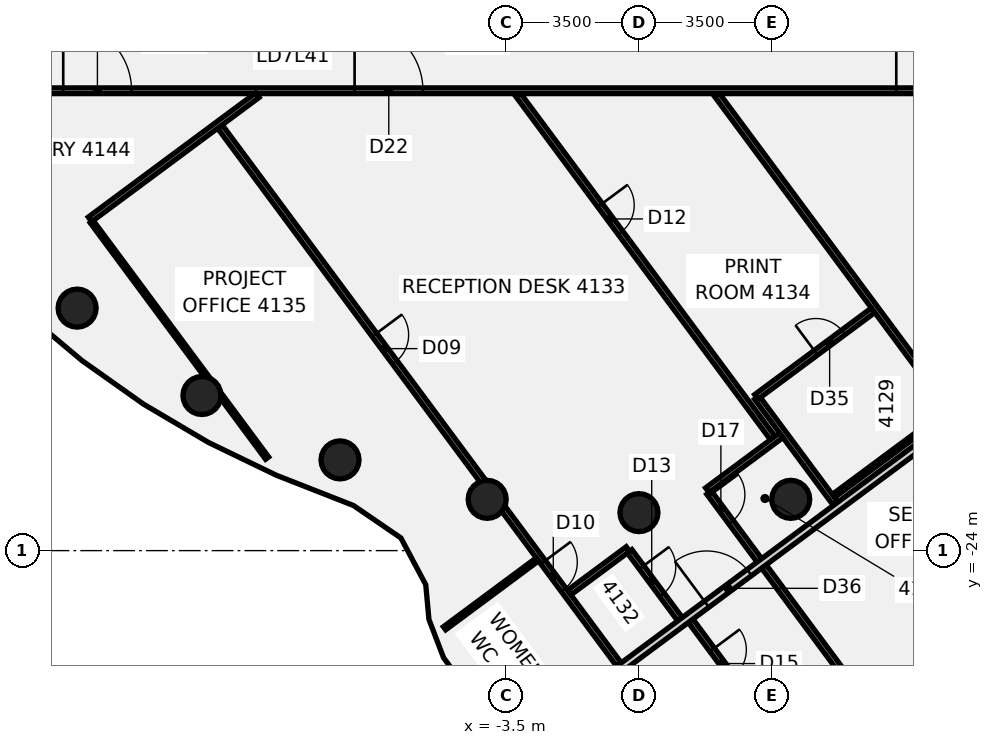
"""IFC4 building model, lengths in metres.
Left out: names, types, materials, properties, quantities, classifications, styles, units other than length and angle.
Written with IfcOpenShell. Run it as: python <this file> out.ifc"""

import sys

from ifc_helpers import new_model, si_unit, direction, frame, frame_2d, origin, origin_2d, place, context, subcontext, project, spatial, rectangle, circle, extrude, element, fill, save


model = new_model("IFC4")
c1 = context("Model", 3, precision=1e-05, world=origin(), true_north=direction((0.0, 1.0)))
c2 = subcontext(c1, "Body", "Model", "MODEL_VIEW")
j1 = project(units=[si_unit("LENGTHUNIT", "METRE"), si_unit("PLANEANGLEUNIT", "RADIAN")], contexts=[c1])
p1 = place(None, origin())
s1 = spatial("IfcSite", under=j1, at=p1, CompositionType="ELEMENT")
p2 = place(p1, origin())
s2 = spatial("IfcBuilding", under=s1, at=p2, CompositionType="ELEMENT")
p3 = place(p2, frame((0.0, 0.0, 166.75)))
s3 = spatial("IfcBuildingStorey", under=s2, at=p3, CompositionType="ELEMENT", Elevation=166.75)
for number, where, z_axis, x_axis in (
    (1, (-14.784, -17.619, -0.14), (0.0, 0.0, 1.0), (1.0, 0.0, 0.0)),
    (2, (-11.5, -19.919, -0.14), (0.0, 0.0, 1.0), (1.0, 0.0, 0.0)),
    (3, (-7.866, -21.613, -0.14), (0.0, 0.0, 1.0), (1.0, 0.0, 0.0)),
    (4, (-3.994, -22.651, -0.14), (0.0, 0.0, 1.0), (1.0, 0.0, 0.0)),
    (5, (0.0, -23.0, -0.14), (0.0, 0.0, 1.0), (1.0, 0.0, 0.0)),
    (6, (3.994, -22.651, -0.14), (0.0, 0.0, 1.0), (1.0, 0.0, 0.0)),
):
    element("IfcColumn", number, at=place(p3, frame(where, z_axis=z_axis, x_axis=x_axis)), inside=s3, PredefinedType="COLUMN", context=c2, shape_type="SweptSolid", body=[
        extrude(circle(Radius=0.5, at=origin_2d()), origin(), (0.0, 0.0, 1.0), 3.75),
    ])
p4 = place(p3, frame((-14.4, -15.344, 0.0), z_axis=(0.0, 0.0, 1.0), x_axis=(0.595809139837, -0.803126060396, 0.0)))
e7 = element("IfcWall", 7, at=p4, inside=s3, PredefinedType="PARTITIONING", context=c2, shape_type="SweptSolid", body=[
    extrude(rectangle(XDim=5.108, YDim=0.1, at=frame_2d((2.554, 0.0))), origin(), (0.0, 0.0, 1.0), 3.01),
])
p5 = place(p3, frame((-10.994, -19.935, 0.0), z_axis=(0.0, 0.0, 1.0), x_axis=(0.595779392593, -0.803148127908, 0.0)))
e8 = element("IfcWall", 8, at=p5, inside=s3, PredefinedType="PARTITIONING", context=c2, shape_type="SweptSolid", body=[
    extrude(rectangle(XDim=2.031, YDim=0.1, at=frame_2d((1.016, 0.0))), origin(), (0.0, 0.0, 1.0), 3.01),
])
p6 = place(p3, frame((-11.024, -12.846, 0.0), z_axis=(0.0, 0.0, 1.0), x_axis=(0.595804045693, -0.803129839525, 0.0)))
e9 = element("IfcWall", 9, at=p6, inside=s3, PredefinedType="PARTITIONING", context=c2, shape_type="SweptSolid", body=[
    extrude(rectangle(XDim=11.846, YDim=0.15, at=frame_2d((5.923, 0.0))), origin(), (0.0, 0.0, 1.0), 3.01),
])
p7 = place(p6, frame((6.82, 0.0, 0.0)))
e10 = element("IfcOpeningElement", 10, at=p7, cuts=e9, PredefinedType="OPENING", context=c2, shape_type="SweptSolid", body=[
    extrude(rectangle(XDim=0.9, YDim=2.1, at=frame_2d((0.45, 1.05))), frame((0.0, 0.085, 0.0), z_axis=(0.0, -1.0, 0.0), x_axis=(1.0, 0.0, 0.0)), (0.0, 0.0, 1.0), 0.17),
])
p8 = place(p3, frame((-3.698, -22.722, 0.0), z_axis=(0.0, 0.0, 1.0), x_axis=(0.595780136415, -0.803147576136, 0.0)))
e11 = element("IfcWall", 11, at=p8, inside=s3, PredefinedType="PARTITIONING", context=c2, shape_type="SweptSolid", body=[
    extrude(rectangle(XDim=5.324, YDim=0.15, at=frame_2d((2.662, 0.0))), origin(), (0.0, 0.0, 1.0), 3.01),
])
p9 = place(p8, frame((1.973, 0.0, 0.0)))
e12 = element("IfcOpeningElement", 12, at=p9, cuts=e11, PredefinedType="OPENING", context=c2, shape_type="SweptSolid", body=[
    extrude(rectangle(XDim=0.9, YDim=2.1, at=frame_2d((0.45, 1.05))), frame((0.0, 0.085, 0.0), z_axis=(0.0, -1.0, 0.0), x_axis=(1.0, 0.0, 0.0)), (0.0, 0.0, 1.0), 0.17),
])
p10 = place(p3, frame((-3.185, -12.0, 0.0), z_axis=(0.0, 0.0, 1.0), x_axis=(0.595796799858, -0.803135214817, 0.0)))
e13 = element("IfcWall", 13, at=p10, inside=s3, PredefinedType="PARTITIONING", context=c2, shape_type="SweptSolid", body=[
    extrude(rectangle(XDim=11.249, YDim=0.15, at=frame_2d((5.624, 0.0))), origin(), (0.0, 0.0, 1.0), 3.01),
])
p11 = place(p10, frame((3.625, 0.0, 0.0)))
e14 = element("IfcOpeningElement", 14, at=p11, cuts=e13, PredefinedType="OPENING", context=c2, shape_type="SweptSolid", body=[
    extrude(rectangle(XDim=0.9, YDim=2.1, at=frame_2d((0.45, 1.05))), frame((0.0, 0.085, 0.0), z_axis=(0.0, -1.0, 0.0), x_axis=(1.0, 0.0, 0.0)), (0.0, 0.0, 1.0), 0.17),
])
p12 = place(p3, frame((-0.245, -24.018, 0.0), z_axis=(0.0, 0.0, 1.0), x_axis=(0.595725941759, -0.803187775252, 0.0)))
e15 = element("IfcWall", 15, at=p12, inside=s3, PredefinedType="PARTITIONING", context=c2, shape_type="SweptSolid", body=[
    extrude(rectangle(XDim=2.225, YDim=0.15, at=frame_2d((1.113, 0.0))), origin(), (0.0, 0.0, 1.0), 3.01),
])
p13 = place(p12, frame((0.525, 0.0, 0.0)))
e16 = element("IfcOpeningElement", 16, at=p13, cuts=e15, PredefinedType="OPENING", context=c2, shape_type="SweptSolid", body=[
    extrude(rectangle(XDim=0.9, YDim=2.1, at=frame_2d((0.45, 1.05))), frame((0.0, 0.085, 0.0), z_axis=(0.0, -1.0, 0.0), x_axis=(1.0, 0.0, 0.0)), (0.0, 0.0, 1.0), 0.17),
])
p14 = place(p3, frame((1.36, -25.847, 0.0), z_axis=(0.0, 0.0, 1.0), x_axis=(0.595903510496, -0.803056041742, 0.0)))
e17 = element("IfcWall", 17, at=p14, inside=s3, PredefinedType="PARTITIONING", context=c2, shape_type="SweptSolid", body=[
    extrude(rectangle(XDim=3.86, YDim=0.15, at=frame_2d((1.93, 0.0))), origin(), (0.0, 0.0, 1.0), 3.01),
])
p15 = place(p14, frame((0.95, 0.0, 0.0)))
e18 = element("IfcOpeningElement", 18, at=p15, cuts=e17, PredefinedType="OPENING", context=c2, shape_type="SweptSolid", body=[
    extrude(rectangle(XDim=0.9, YDim=2.1, at=frame_2d((0.45, 1.05))), frame((0.0, 0.085, 0.0), z_axis=(0.0, -1.0, 0.0), x_axis=(1.0, 0.0, 0.0)), (0.0, 0.0, 1.0), 0.17),
])
p16 = place(p3, frame((1.846, -22.473, 0.0), z_axis=(0.0, 0.0, 1.0), x_axis=(0.595730224084, -0.803184599026, 0.0)))
e19 = element("IfcWall", 19, at=p16, inside=s3, PredefinedType="PARTITIONING", context=c2, shape_type="SweptSolid", body=[
    extrude(rectangle(XDim=20.24, YDim=0.15, at=frame_2d((10.12, 0.0))), origin(), (0.0, 0.0, 1.0), 3.01),
])
p17 = place(p16, frame((0.07, 0.0, 0.0)))
e20 = element("IfcOpeningElement", 20, at=p17, cuts=e19, PredefinedType="OPENING", context=c2, shape_type="SweptSolid", body=[
    extrude(rectangle(XDim=0.9, YDim=2.1, at=frame_2d((0.45, 1.05))), frame((0.0, 0.085, 0.0), z_axis=(0.0, -1.0, 0.0), x_axis=(1.0, 0.0, 0.0)), (0.0, 0.0, 1.0), 0.17),
])
p18 = place(p16, frame((10.57, 0.0, 0.0)))
e21 = element("IfcOpeningElement", 21, at=p18, cuts=e19, PredefinedType="OPENING", context=c2, shape_type="SweptSolid", body=[
    extrude(rectangle(XDim=0.9, YDim=2.1, at=frame_2d((0.45, 1.05))), frame((0.0, 0.085, 0.0), z_axis=(0.0, -1.0, 0.0), x_axis=(1.0, 0.0, 0.0)), (0.0, 0.0, 1.0), 0.17),
])
p19 = place(p16, frame((17.021, 0.0, 0.0)))
e22 = element("IfcOpeningElement", 22, at=p19, cuts=e19, PredefinedType="OPENING", context=c2, shape_type="SweptSolid", body=[
    extrude(rectangle(XDim=0.9, YDim=2.1, at=frame_2d((0.45, 1.05))), frame((0.0, 0.085, 0.0), z_axis=(0.0, -1.0, 0.0), x_axis=(1.0, 0.0, 0.0)), (0.0, 0.0, 1.0), 0.17),
])
p20 = place(p3, frame((2.045, -12.0, 0.0), z_axis=(0.0, 0.0, 1.0), x_axis=(0.595715728825, -0.803195350105, 0.0)))
e23 = element("IfcWall", 23, at=p20, inside=s3, PredefinedType="PARTITIONING", context=c2, shape_type="SweptSolid", body=[
    extrude(rectangle(XDim=13.823, YDim=0.15, at=frame_2d((6.911, 0.0))), origin(), (0.0, 0.0, 1.0), 3.01),
])
p21 = place(p3, frame((3.103, -19.972, 0.0), z_axis=(0.0, 0.0, 1.0), x_axis=(0.595758856769, -0.80316336108, 0.0)))
e24 = element("IfcWall", 24, at=p21, inside=s3, PredefinedType="PARTITIONING", context=c2, shape_type="SweptSolid", body=[
    extrude(rectangle(XDim=3.461, YDim=0.15, at=frame_2d((1.73, 0.0))), origin(), (0.0, 0.0, 1.0), 3.01),
])
p22 = place(p3, frame((-17.1, -11.9, 0.0), z_axis=(0.0, 0.0, 1.0), x_axis=(1.0, 0.0, 0.0)))
e25 = element("IfcWall", 25, at=p22, inside=s3, PredefinedType="PARTITIONING", context=c2, shape_type="SweptSolid", body=[
    extrude(rectangle(XDim=34.165, YDim=0.15, at=frame_2d((17.083, 0.0))), origin(), (0.0, 0.0, 1.0), 3.01),
])
p23 = place(p22, frame((9.617, 0.0, 0.0)))
e26 = element("IfcOpeningElement", 26, at=p23, cuts=e25, PredefinedType="OPENING", context=c2, shape_type="SweptSolid", body=[
    extrude(rectangle(XDim=1.8, YDim=2.1, at=frame_2d((0.9, 1.05))), frame((0.0, 0.085, 0.0), z_axis=(0.0, -1.0, 0.0), x_axis=(1.0, 0.0, 0.0)), (0.0, 0.0, 1.0), 0.17),
])
p24 = place(p22, frame((1.95, 0.0, 0.0)))
e27 = element("IfcOpeningElement", 27, at=p24, cuts=e25, PredefinedType="OPENING", context=c2, shape_type="SweptSolid", body=[
    extrude(rectangle(XDim=1.8, YDim=2.1, at=frame_2d((0.9, 1.05))), frame((0.0, 0.085, 0.0), z_axis=(0.0, -1.0, 0.0), x_axis=(1.0, 0.0, 0.0)), (0.0, 0.0, 1.0), 0.17),
])
p25 = place(p22, frame((23.871, 0.0, 0.0)))
e28 = element("IfcOpeningElement", 28, at=p25, cuts=e25, PredefinedType="OPENING", context=c2, shape_type="SweptSolid", body=[
    extrude(rectangle(XDim=1.8, YDim=2.1, at=frame_2d((0.9, 1.05))), frame((0.0, 0.085, 0.0), z_axis=(0.0, -1.0, 0.0), x_axis=(1.0, 0.0, 0.0)), (0.0, 0.0, 1.0), 0.17),
])
p26 = place(p3, frame((-14.445, -15.284, 0.0), z_axis=(0.0, 0.0, 1.0), x_axis=(0.803166728219, 0.595754317385, 0.0)))
e29 = element("IfcWall", 29, at=p26, inside=s3, PredefinedType="PARTITIONING", context=c2, shape_type="SweptSolid", body=[
    extrude(rectangle(XDim=5.485, YDim=0.15, at=frame_2d((2.743, 0.0))), origin(), (0.0, 0.0, 1.0), 3.01),
])
p27 = place(p3, frame((-5.115, -26.043, 0.0), z_axis=(0.0, 0.0, 1.0), x_axis=(0.803080684867, 0.595870299304, 0.0)))
e30 = element("IfcWall", 30, at=p27, inside=s3, PredefinedType="PARTITIONING", context=c2, shape_type="SweptSolid", body=[
    extrude(rectangle(XDim=3.042, YDim=0.1, at=frame_2d((1.521, 0.0))), origin(), (0.0, 0.0, 1.0), 3.01),
])
p28 = place(p3, frame((3.09, -19.955, 0.0), z_axis=(0.0, 0.0, 1.0), x_axis=(0.803088161311, 0.595860222839, 0.0)))
e31 = element("IfcWall", 31, at=p28, inside=s3, PredefinedType="PARTITIONING", context=c2, shape_type="SweptSolid", body=[
    extrude(rectangle(XDim=3.82, YDim=0.15, at=frame_2d((1.91, 0.0))), origin(), (0.0, 0.0, 1.0), 3.01),
])
p29 = place(p28, frame((1.95, 0.0, 0.0)))
e32 = element("IfcOpeningElement", 32, at=p29, cuts=e31, PredefinedType="OPENING", context=c2, shape_type="SweptSolid", body=[
    extrude(rectangle(XDim=0.9, YDim=2.1, at=frame_2d((0.45, 1.05))), frame((0.0, 0.085, 0.0), z_axis=(0.0, -1.0, 0.0), x_axis=(1.0, 0.0, 0.0)), (0.0, 0.0, 1.0), 0.17),
])
p30 = place(p3, frame((-3.116, -29.043, 0.0), z_axis=(0.0, 0.0, 1.0), x_axis=(0.803114725205, 0.595824418901, 0.0)))
e33 = element("IfcWall", 33, at=p30, inside=s3, PredefinedType="PARTITIONING", context=c2, shape_type="SweptSolid", body=[
    extrude(rectangle(XDim=14.219, YDim=0.2, at=frame_2d((7.11, 0.0))), origin(), (0.0, 0.0, 1.0), 3.01),
])
p31 = place(p30, frame((6.099, 0.0, 0.0)))
e34 = element("IfcOpeningElement", 34, at=p31, cuts=e33, PredefinedType="OPENING", context=c2, shape_type="SweptSolid", body=[
    extrude(rectangle(XDim=1.4, YDim=2.1, at=frame_2d((0.7, 1.05))), frame((0.0, 0.11, 0.0), z_axis=(0.0, -1.0, 0.0), x_axis=(1.0, 0.0, 0.0)), (0.0, 0.0, 1.0), 0.22),
])
p32 = place(p3, frame((-1.833, -25.102, 0.0), z_axis=(0.0, 0.0, 1.0), x_axis=(0.803176502208, 0.595741140346, 0.0)))
e35 = element("IfcWall", 35, at=p32, inside=s3, PredefinedType="PARTITIONING", context=c2, shape_type="SweptSolid", body=[
    extrude(rectangle(XDim=1.921, YDim=0.15, at=frame_2d((0.96, 0.0))), origin(), (0.0, 0.0, 1.0), 3.01),
])
p33 = place(p3, frame((1.798, -22.409, 0.0), z_axis=(0.0, 0.0, 1.0), x_axis=(0.803172774145, 0.595746166477, 0.0)))
e36 = element("IfcWall", 36, at=p33, inside=s3, PredefinedType="PARTITIONING", context=c2, shape_type="SweptSolid", body=[
    extrude(rectangle(XDim=2.42, YDim=0.15, at=frame_2d((1.21, 0.0))), origin(), (0.0, 0.0, 1.0), 3.01),
])
p34 = place(p3, frame((5.121, -22.559, 0.0), z_axis=(0.0, 0.0, 1.0), x_axis=(0.803099035859, 0.595845566067, 0.0)))
e37 = element("IfcWall", 37, at=p34, inside=s3, PredefinedType="PARTITIONING", context=c2, shape_type="SweptSolid", body=[
    extrude(rectangle(XDim=3.74, YDim=0.1, at=frame_2d((1.87, 0.0))), origin(), (0.0, 0.0, 1.0), 3.01),
])
p35 = place(p7, frame((0.9, 0.0, 0.0), z_axis=(0.0, 0.0, 1.0), x_axis=(-1.0, 0.0, 0.0)))
e38 = element("IfcDoor", 38, at=p35, inside=s3, OperationType="SINGLE_SWING_RIGHT", PredefinedType="DOOR", context=c2, shape_type="SweptSolid", body=[
    extrude(rectangle(XDim=0.9, YDim=2.1, at=frame_2d((0.45, 1.05))), frame((0.0, 0.025, 0.0), z_axis=(0.0, -1.0, 0.0), x_axis=(1.0, 0.0, 0.0)), (0.0, 0.0, 1.0), 0.05),
])
fill(e10, e38)
p36 = place(p9, frame((0.9, 0.0, 0.0), z_axis=(0.0, 0.0, 1.0), x_axis=(-1.0, 0.0, 0.0)))
e39 = element("IfcDoor", 39, at=p36, inside=s3, OperationType="SINGLE_SWING_LEFT", PredefinedType="DOOR", context=c2, shape_type="SweptSolid", body=[
    extrude(rectangle(XDim=0.9, YDim=2.1, at=frame_2d((0.45, 1.05))), frame((0.0, 0.025, 0.0), z_axis=(0.0, -1.0, 0.0), x_axis=(1.0, 0.0, 0.0)), (0.0, 0.0, 1.0), 0.05),
])
fill(e12, e39)
p37 = place(p11, origin())
e40 = element("IfcDoor", 40, at=p37, inside=s3, OperationType="SINGLE_SWING_RIGHT", PredefinedType="DOOR", context=c2, shape_type="SweptSolid", body=[
    extrude(rectangle(XDim=0.9, YDim=2.1, at=frame_2d((0.45, 1.05))), frame((0.0, 0.025, 0.0), z_axis=(0.0, -1.0, 0.0), x_axis=(1.0, 0.0, 0.0)), (0.0, 0.0, 1.0), 0.05),
])
fill(e14, e40)
p38 = place(p13, frame((0.9, 0.0, 0.0), z_axis=(0.0, 0.0, 1.0), x_axis=(-1.0, 0.0, 0.0)))
e41 = element("IfcDoor", 41, at=p38, inside=s3, OperationType="SINGLE_SWING_LEFT", PredefinedType="DOOR", context=c2, shape_type="SweptSolid", body=[
    extrude(rectangle(XDim=0.9, YDim=2.1, at=frame_2d((0.45, 1.05))), frame((0.0, 0.025, 0.0), z_axis=(0.0, -1.0, 0.0), x_axis=(1.0, 0.0, 0.0)), (0.0, 0.0, 1.0), 0.05),
])
fill(e16, e41)
p39 = place(p15, frame((0.9, 0.0, 0.0), z_axis=(0.0, 0.0, 1.0), x_axis=(-1.0, 0.0, 0.0)))
e42 = element("IfcDoor", 42, at=p39, inside=s3, OperationType="SINGLE_SWING_LEFT", PredefinedType="DOOR", context=c2, shape_type="SweptSolid", body=[
    extrude(rectangle(XDim=0.9, YDim=2.1, at=frame_2d((0.45, 1.05))), frame((0.0, 0.025, 0.0), z_axis=(0.0, -1.0, 0.0), x_axis=(1.0, 0.0, 0.0)), (0.0, 0.0, 1.0), 0.05),
])
fill(e18, e42)
p40 = place(p17, origin())
e43 = element("IfcDoor", 43, at=p40, inside=s3, OperationType="SINGLE_SWING_RIGHT", PredefinedType="DOOR", context=c2, shape_type="SweptSolid", body=[
    extrude(rectangle(XDim=0.9, YDim=2.1, at=frame_2d((0.45, 1.05))), frame((0.0, 0.025, 0.0), z_axis=(0.0, -1.0, 0.0), x_axis=(1.0, 0.0, 0.0)), (0.0, 0.0, 1.0), 0.05),
])
fill(e20, e43)
p41 = place(p23, origin())
e44 = element("IfcDoor", 44, at=p41, inside=s3, OperationType="DOUBLE_DOOR_SINGLE_SWING", PredefinedType="DOOR", context=c2, shape_type="SweptSolid", body=[
    extrude(rectangle(XDim=1.8, YDim=2.1, at=frame_2d((0.9, 1.05))), frame((0.0, 0.025, 0.0), z_axis=(0.0, -1.0, 0.0), x_axis=(1.0, 0.0, 0.0)), (0.0, 0.0, 1.0), 0.05),
])
fill(e26, e44)
p42 = place(p24, frame((1.8, 0.0, 0.0), z_axis=(0.0, 0.0, 1.0), x_axis=(-1.0, 0.0, 0.0)))
e45 = element("IfcDoor", 45, at=p42, inside=s3, OperationType="DOUBLE_DOOR_SINGLE_SWING", PredefinedType="DOOR", context=c2, shape_type="SweptSolid", body=[
    extrude(rectangle(XDim=1.8, YDim=2.1, at=frame_2d((0.9, 1.05))), frame((0.0, 0.025, 0.0), z_axis=(0.0, -1.0, 0.0), x_axis=(1.0, 0.0, 0.0)), (0.0, 0.0, 1.0), 0.05),
])
fill(e27, e45)
p43 = place(p25, frame((1.8, 0.0, 0.0), z_axis=(0.0, 0.0, 1.0), x_axis=(-1.0, 0.0, 0.0)))
e46 = element("IfcDoor", 46, at=p43, inside=s3, OperationType="DOUBLE_DOOR_SINGLE_SWING", PredefinedType="DOOR", context=c2, shape_type="SweptSolid", body=[
    extrude(rectangle(XDim=1.8, YDim=2.1, at=frame_2d((0.9, 1.05))), frame((0.0, 0.025, 0.0), z_axis=(0.0, -1.0, 0.0), x_axis=(1.0, 0.0, 0.0)), (0.0, 0.0, 1.0), 0.05),
])
fill(e28, e46)
p44 = place(p29, frame((0.9, 0.0, 0.0), z_axis=(0.0, 0.0, 1.0), x_axis=(-1.0, 0.0, 0.0)))
e47 = element("IfcDoor", 47, at=p44, inside=s3, OperationType="SINGLE_SWING_RIGHT", PredefinedType="DOOR", context=c2, shape_type="SweptSolid", body=[
    extrude(rectangle(XDim=0.9, YDim=2.1, at=frame_2d((0.45, 1.05))), frame((0.0, 0.025, 0.0), z_axis=(0.0, -1.0, 0.0), x_axis=(1.0, 0.0, 0.0)), (0.0, 0.0, 1.0), 0.05),
])
fill(e32, e47)
p45 = place(p31, origin())
e48 = element("IfcDoor", 48, at=p45, inside=s3, OperationType="DOUBLE_DOOR_SINGLE_SWING", PredefinedType="DOOR", context=c2, shape_type="SweptSolid", body=[
    extrude(rectangle(XDim=1.4, YDim=2.1, at=frame_2d((0.7, 1.05))), frame((0.0, 0.025, 0.0), z_axis=(0.0, -1.0, 0.0), x_axis=(1.0, 0.0, 0.0)), (0.0, 0.0, 1.0), 0.05),
])
fill(e34, e48)
save(model, sys.argv[1])
